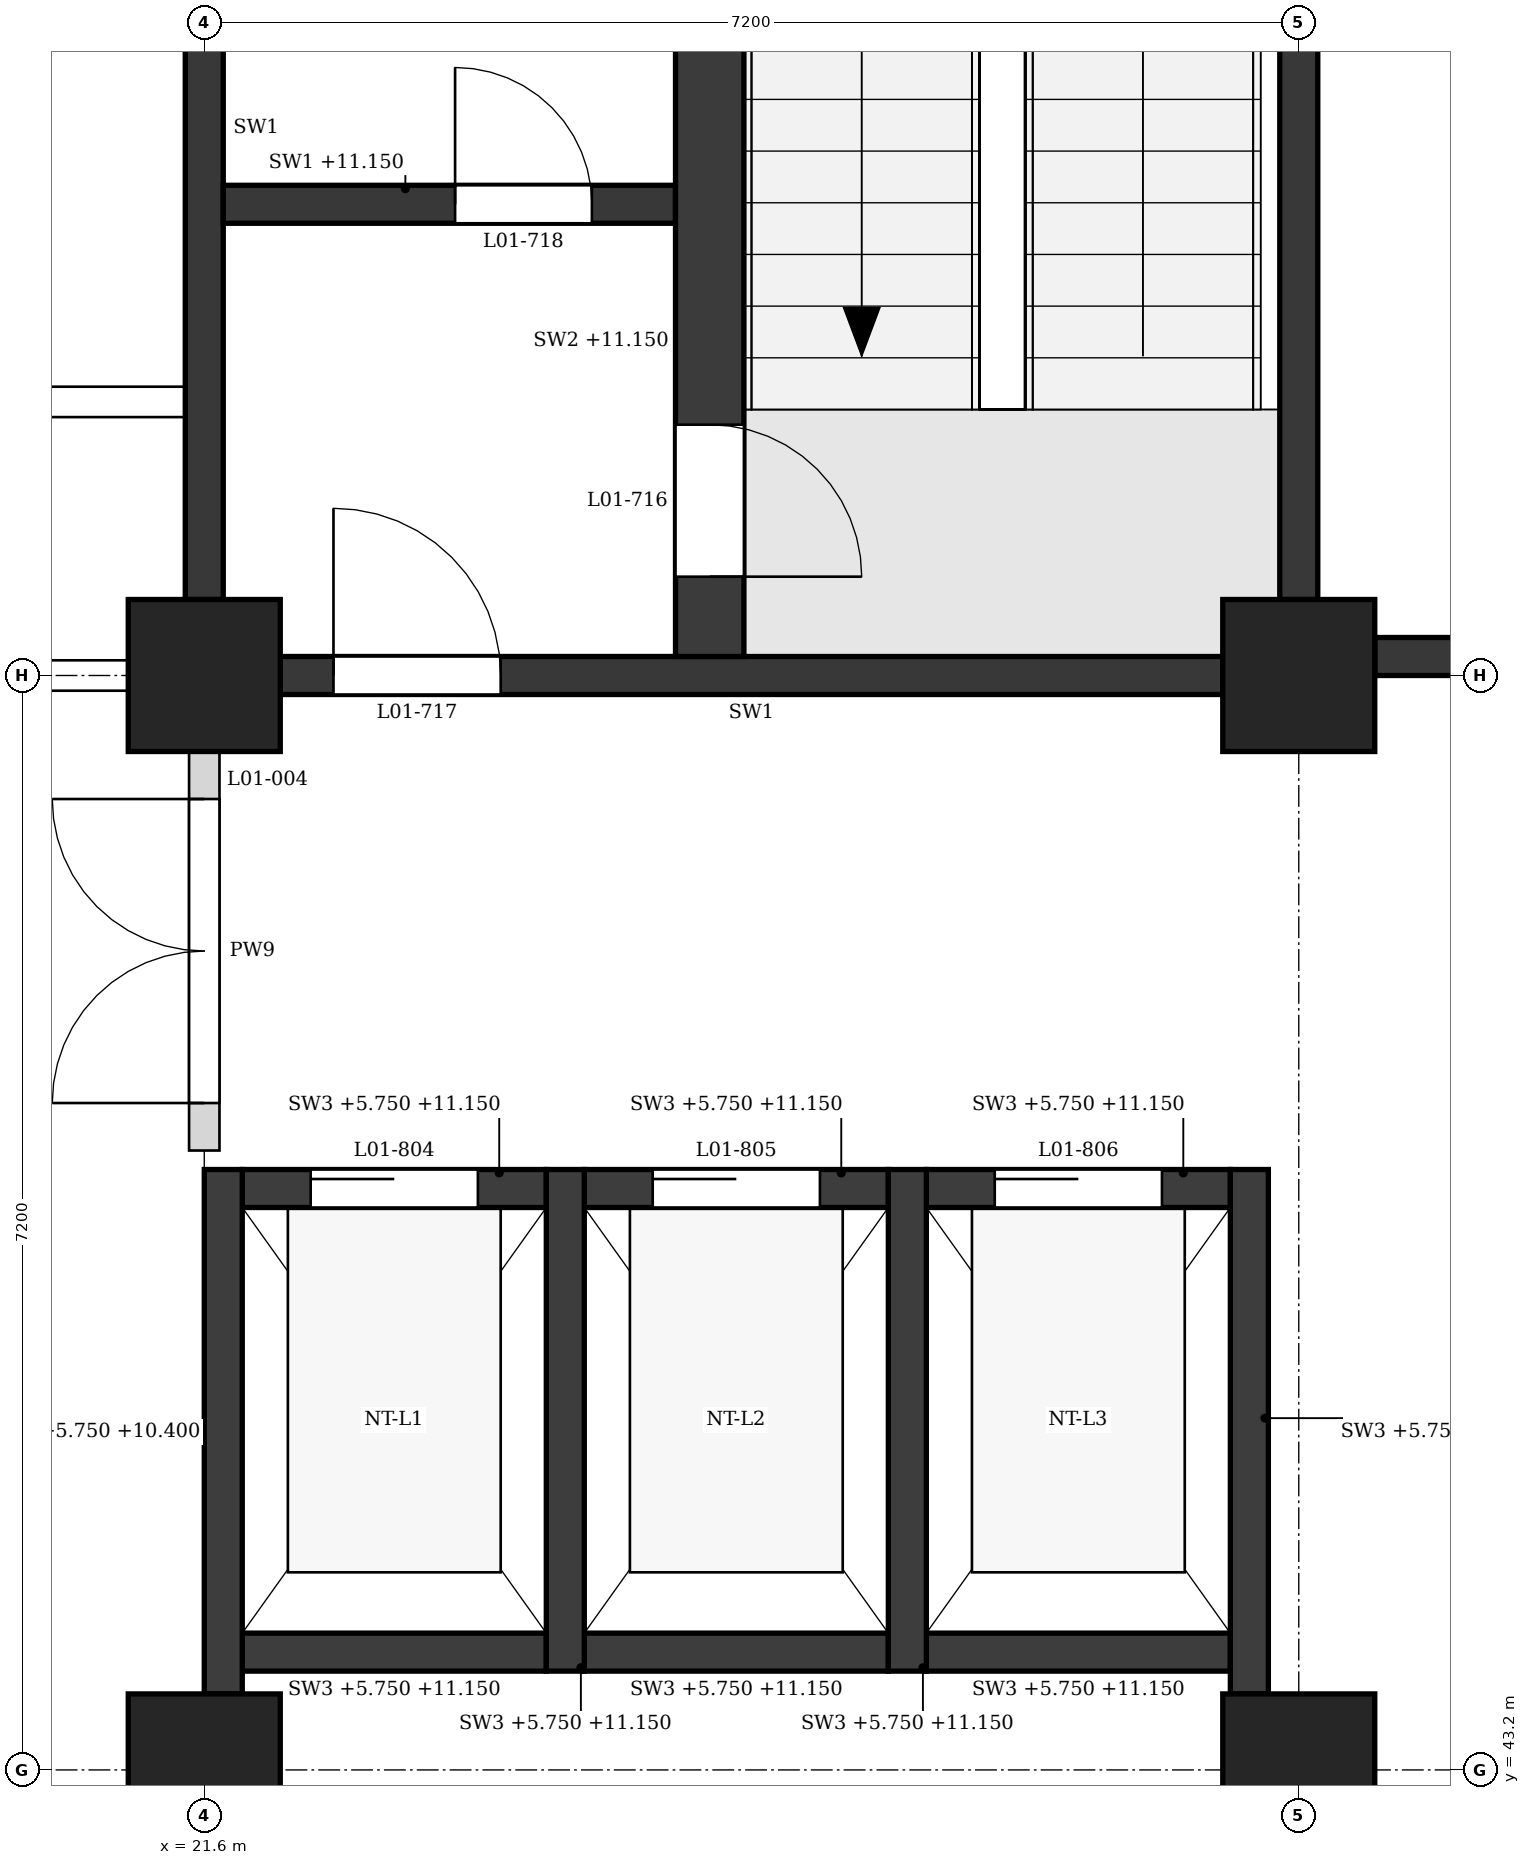
"""IFC4 building model, lengths in metres.
Left out: names, types, materials, properties, quantities, classifications, styles, units other than length and angle.
Written with IfcOpenShell. Run it as: python <this file> out.ifc"""

import sys

from ifc_helpers import new_model, si_unit, direction, frame, frame_2d, origin, origin_2d, place, context, subcontext, project, spatial, polyline, rectangle, outline, extrude, element, fill, save


model = new_model("IFC4")
c1 = context("Model", 3, precision=1e-05, world=origin(), true_north=direction((0.0, 1.0)))
c2 = subcontext(c1, "Body", "Model", "MODEL_VIEW")
j1 = project(units=[si_unit("LENGTHUNIT", "METRE"), si_unit("PLANEANGLEUNIT", "RADIAN")], contexts=[c1])
p1 = place(None, origin())
s1 = spatial("IfcSite", under=j1, at=p1, CompositionType="ELEMENT")
p2 = place(p1, origin())
s2 = spatial("IfcBuilding", under=s1, at=p2, CompositionType="ELEMENT")
p3 = place(p2, frame((0.0, 0.0, 6.0)))
s3 = spatial("IfcBuildingStorey", under=s2, at=p3, CompositionType="ELEMENT", Elevation=6.0)
for number, where, z_axis, x_axis in (
    (1, (21.6, 43.2, 0.0), (0.0, 0.0, 1.0), (1.0, 0.0, 0.0)),
    (2, (21.6, 50.4, 0.0), (0.0, 0.0, 1.0), (1.0, 0.0, 0.0)),
    (3, (28.8, 43.2, 0.0), (0.0, 0.0, 1.0), (1.0, 0.0, 0.0)),
    (4, (28.8, 50.4, 0.0), (0.0, 0.0, 1.0), (1.0, 0.0, 0.0)),
):
    element("IfcColumn", number, at=place(p3, frame(where, z_axis=z_axis, x_axis=x_axis)), inside=s3, PredefinedType="COLUMN", context=c2, shape_type="SweptSolid", body=[
        extrude(rectangle(XDim=1.0, YDim=1.0, at=origin_2d()), origin(), (0.0, 0.0, 1.0), 5.4),
    ])
p4 = place(p3, frame((29.3, 50.525, 0.0), z_axis=(0.0, 0.0, 1.0), x_axis=(1.0, 0.0, 0.0)))
e5 = element("IfcWall", 5, at=p4, inside=s3, PredefinedType="SHEAR", context=c2, shape_type="SweptSolid", body=[
    extrude(rectangle(XDim=6.275, YDim=0.25, at=frame_2d((3.137, 0.0))), origin(), (0.0, 0.0, 1.0), 4.7),
])
p5 = place(p3, frame((28.8, 50.9, -0.25), z_axis=(0.0, 0.0, 1.0), x_axis=(0.0, 1.0, 0.0)))
e6 = element("IfcWall", 6, at=p5, inside=s3, PredefinedType="SHEAR", context=c2, shape_type="SweptSolid", body=[
    extrude(rectangle(XDim=6.2, YDim=0.25, at=frame_2d((3.1, 0.0))), origin(), (0.0, 0.0, 1.0), 4.8),
])
p6 = place(p3, frame((22.1, 50.4, 0.0), z_axis=(0.0, 0.0, 1.0), x_axis=(1.0, 0.0, 0.0)))
e7 = element("IfcWall", 7, at=p6, inside=s3, PredefinedType="SHEAR", context=c2, shape_type="SweptSolid", body=[
    extrude(rectangle(XDim=6.2, YDim=0.25, at=frame_2d((3.1, 0.0))), origin(), (0.0, 0.0, 1.0), 4.4),
])
p7 = place(p6, frame((0.35, 0.0, 0.0)))
e8 = element("IfcOpeningElement", 8, at=p7, cuts=e7, PredefinedType="OPENING", context=c2, shape_type="SweptSolid", body=[
    extrude(rectangle(XDim=1.1, YDim=2.1, at=frame_2d((0.55, 1.05))), frame((0.0, 0.135, 0.0), z_axis=(0.0, -1.0, 0.0), x_axis=(1.0, 0.0, 0.0)), (0.0, 0.0, 1.0), 0.27),
])
p8 = place(p3, frame((21.6, 50.9, 0.0), z_axis=(0.0, 0.0, 1.0), x_axis=(0.0, 1.0, 0.0)))
e9 = element("IfcWall", 9, at=p8, inside=s3, PredefinedType="SHEAR", context=c2, shape_type="SweptSolid", body=[
    extrude(rectangle(XDim=6.2, YDim=0.25, at=frame_2d((3.1, 0.0))), origin(), (0.0, 0.0, 1.0), 4.4),
])
p9 = place(p3, frame((24.925, 50.525, 0.0), z_axis=(0.0, 0.0, 1.0), x_axis=(0.0, 1.0, 0.0)))
e10 = element("IfcWall", 10, at=p9, inside=s3, PredefinedType="SHEAR", context=c2, shape_type="SweptSolid", body=[
    extrude(rectangle(XDim=6.925, YDim=0.45, at=frame_2d((3.462, 0.0))), origin(), (0.0, 0.0, 1.0), 5.15),
])
p10 = place(p9, frame((0.525, 0.0, 0.0)))
e11 = element("IfcOpeningElement", 11, at=p10, cuts=e10, PredefinedType="OPENING", context=c2, shape_type="SweptSolid", body=[
    extrude(rectangle(XDim=1.0, YDim=2.1, at=frame_2d((0.5, 1.05))), frame((0.0, 0.235, 0.0), z_axis=(0.0, -1.0, 0.0), x_axis=(1.0, 0.0, 0.0)), (0.0, 0.0, 1.0), 0.47),
])
p11 = place(p3, frame((21.725, 53.5, 0.0), z_axis=(0.0, 0.0, 1.0), x_axis=(1.0, 0.0, 0.0)))
e12 = element("IfcWall", 12, at=p11, inside=s3, PredefinedType="SHEAR", context=c2, shape_type="SweptSolid", body=[
    extrude(rectangle(XDim=2.975, YDim=0.25, at=frame_2d((1.487, 0.0))), origin(), (0.0, 0.0, 1.0), 5.15),
])
p12 = place(p11, frame((1.525, 0.0, 0.0)))
e13 = element("IfcOpeningElement", 13, at=p12, cuts=e12, PredefinedType="OPENING", context=c2, shape_type="SweptSolid", body=[
    extrude(rectangle(XDim=0.9, YDim=2.1, at=frame_2d((0.45, 1.05))), frame((0.0, 0.135, 0.0), z_axis=(0.0, -1.0, 0.0), x_axis=(1.0, 0.0, 0.0)), (0.0, 0.0, 1.0), 0.27),
])
p13 = place(p3, frame((21.725, 43.7, -0.25), z_axis=(0.0, 0.0, 1.0), x_axis=(0.0, 1.0, 0.0)))
e14 = element("IfcWall", 14, at=p13, inside=s3, PredefinedType="SHEAR", context=c2, shape_type="SweptSolid", body=[
    extrude(rectangle(XDim=3.45, YDim=0.25, at=frame_2d((1.725, 0.0))), origin(), (0.0, 0.0, 1.0), 4.65),
])
for number, where, z_axis, x_axis in (
    (15, (23.975, 43.85, -0.25), (0.0, 0.0, 1.0), (0.0, 1.0, 0.0)),
    (16, (26.225, 43.85, -0.25), (0.0, 0.0, 1.0), (0.0, 1.0, 0.0)),
):
    element("IfcWall", number, at=place(p3, frame(where, z_axis=z_axis, x_axis=x_axis)), inside=s3, PredefinedType="SHEAR", context=c2, shape_type="SweptSolid", body=[
        extrude(rectangle(XDim=3.3, YDim=0.25, at=frame_2d((1.65, 0.0))), origin(), (0.0, 0.0, 1.0), 5.4),
    ])
p14 = place(p3, frame((28.475, 43.7, -0.25), z_axis=(0.0, 0.0, 1.0), x_axis=(0.0, 1.0, 0.0)))
e17 = element("IfcWall", 17, at=p14, inside=s3, PredefinedType="SHEAR", context=c2, shape_type="SweptSolid", body=[
    extrude(rectangle(XDim=3.45, YDim=0.25, at=frame_2d((1.725, 0.0))), origin(), (0.0, 0.0, 1.0), 5.4),
])
p15 = place(p3, frame((21.85, 47.025, -0.25), z_axis=(0.0, 0.0, 1.0), x_axis=(1.0, 0.0, 0.0)))
e18 = element("IfcWall", 18, at=p15, inside=s3, PredefinedType="SHEAR", context=c2, shape_type="SweptSolid", body=[
    extrude(rectangle(XDim=2.0, YDim=0.25, at=frame_2d((1.0, 0.0))), origin(), (0.0, 0.0, 1.0), 5.4),
])
p16 = place(p15, frame((0.45, 0.0, 0.25)))
e19 = element("IfcOpeningElement", 19, at=p16, cuts=e18, PredefinedType="OPENING", context=c2, shape_type="SweptSolid", body=[
    extrude(rectangle(XDim=1.1, YDim=2.1, at=frame_2d((0.55, 1.05))), frame((0.0, 0.135, 0.0), z_axis=(0.0, -1.0, 0.0), x_axis=(1.0, 0.0, 0.0)), (0.0, 0.0, 1.0), 0.27),
])
p17 = place(p3, frame((21.85, 43.975, -0.25), z_axis=(0.0, 0.0, 1.0), x_axis=(1.0, 0.0, 0.0)))
e20 = element("IfcWall", 20, at=p17, inside=s3, PredefinedType="SHEAR", context=c2, shape_type="SweptSolid", body=[
    extrude(rectangle(XDim=2.0, YDim=0.25, at=frame_2d((1.0, 0.0))), origin(), (0.0, 0.0, 1.0), 5.4),
])
p18 = place(p3, frame((24.1, 47.025, -0.25), z_axis=(0.0, 0.0, 1.0), x_axis=(1.0, 0.0, 0.0)))
e21 = element("IfcWall", 21, at=p18, inside=s3, PredefinedType="SHEAR", context=c2, shape_type="SweptSolid", body=[
    extrude(rectangle(XDim=2.0, YDim=0.25, at=frame_2d((1.0, 0.0))), origin(), (0.0, 0.0, 1.0), 5.4),
])
p19 = place(p18, frame((0.45, 0.0, 0.25)))
e22 = element("IfcOpeningElement", 22, at=p19, cuts=e21, PredefinedType="OPENING", context=c2, shape_type="SweptSolid", body=[
    extrude(rectangle(XDim=1.1, YDim=2.1, at=frame_2d((0.55, 1.05))), frame((0.0, 0.135, 0.0), z_axis=(0.0, -1.0, 0.0), x_axis=(1.0, 0.0, 0.0)), (0.0, 0.0, 1.0), 0.27),
])
p20 = place(p3, frame((24.1, 43.975, -0.25), z_axis=(0.0, 0.0, 1.0), x_axis=(1.0, 0.0, 0.0)))
e23 = element("IfcWall", 23, at=p20, inside=s3, PredefinedType="SHEAR", context=c2, shape_type="SweptSolid", body=[
    extrude(rectangle(XDim=2.0, YDim=0.25, at=frame_2d((1.0, 0.0))), origin(), (0.0, 0.0, 1.0), 5.4),
])
p21 = place(p3, frame((26.35, 47.025, -0.25), z_axis=(0.0, 0.0, 1.0), x_axis=(1.0, 0.0, 0.0)))
e24 = element("IfcWall", 24, at=p21, inside=s3, PredefinedType="SHEAR", context=c2, shape_type="SweptSolid", body=[
    extrude(rectangle(XDim=2.0, YDim=0.25, at=frame_2d((1.0, 0.0))), origin(), (0.0, 0.0, 1.0), 5.4),
])
p22 = place(p21, frame((0.45, 0.0, 0.25)))
e25 = element("IfcOpeningElement", 25, at=p22, cuts=e24, PredefinedType="OPENING", context=c2, shape_type="SweptSolid", body=[
    extrude(rectangle(XDim=1.1, YDim=2.1, at=frame_2d((0.55, 1.05))), frame((0.0, 0.135, 0.0), z_axis=(0.0, -1.0, 0.0), x_axis=(1.0, 0.0, 0.0)), (0.0, 0.0, 1.0), 0.27),
])
p23 = place(p3, frame((26.35, 43.975, -0.25), z_axis=(0.0, 0.0, 1.0), x_axis=(1.0, 0.0, 0.0)))
e26 = element("IfcWall", 26, at=p23, inside=s3, PredefinedType="SHEAR", context=c2, shape_type="SweptSolid", body=[
    extrude(rectangle(XDim=2.0, YDim=0.25, at=frame_2d((1.0, 0.0))), origin(), (0.0, 0.0, 1.0), 5.4),
])
p24 = place(p2, origin())
s4 = spatial("IfcBuildingStorey", under=s2, at=p24, CompositionType="ELEMENT", Elevation=0.0)
p25 = place(p24, frame((29.3, 50.2, 0.0), z_axis=(0.0, 0.0, 1.0), x_axis=(1.0, 0.0, 0.0)))
e27 = element("IfcWall", 27, at=p25, inside=s4, PredefinedType="SOLIDWALL", context=c2, shape_type="SweptSolid", body=[
    extrude(rectangle(XDim=6.275, YDim=0.4, at=frame_2d((3.137, 0.0))), origin(), (0.0, 0.0, 1.0), 10.7),
])
p26 = place(p24, frame((29.0, 43.7, 0.0), z_axis=(0.0, 0.0, 1.0), x_axis=(0.0, 1.0, 0.0)))
e28 = element("IfcWall", 28, at=p26, inside=s4, PredefinedType="SOLIDWALL", context=c2, shape_type="SweptSolid", body=[
    extrude(rectangle(XDim=6.2, YDim=0.4, at=frame_2d((3.1, 0.0))), origin(), (0.0, 0.0, 1.0), 10.55),
])
p27 = place(p3, frame((14.9, 50.4, 0.0), z_axis=(0.0, 0.0, 1.0), x_axis=(1.0, 0.0, 0.0)))
e29 = element("IfcWall", 29, at=p27, inside=s3, PredefinedType="PARTITIONING", context=c2, shape_type="SweptSolid", body=[
    extrude(rectangle(XDim=6.2, YDim=0.2, at=frame_2d((3.1, 0.0))), origin(), (0.0, 0.0, 1.0), 4.4),
])
p28 = place(p27, frame((4.15, 0.0, 0.0)))
e30 = element("IfcOpeningElement", 30, at=p28, cuts=e29, PredefinedType="OPENING", context=c2, shape_type="SweptSolid", body=[
    extrude(rectangle(XDim=1.0, YDim=2.1, at=frame_2d((0.5, 1.05))), frame((0.0, 0.11, 0.0), z_axis=(0.0, -1.0, 0.0), x_axis=(1.0, 0.0, 0.0)), (0.0, 0.0, 1.0), 0.22),
])
p29 = place(p3, frame((7.325, 52.2, 0.0), z_axis=(0.0, 0.0, 1.0), x_axis=(1.0, 0.0, 0.0)))
e31 = element("IfcWall", 31, at=p29, inside=s3, PredefinedType="PARTITIONING", context=c2, shape_type="SweptSolid", body=[
    extrude(outline(polyline([(0.0, 0.0), (14.15, 0.0), (14.15, 4.4), (14.025, 4.4), (14.025, 5.15), (7.325, 5.15), (7.325, 4.4), (6.825, 4.4), (6.825, 5.15), (0.125, 5.15), (0.125, 4.4), (0.0, 4.4), (0.0, 0.0)])), frame((0.0, 0.1, 0.0), z_axis=(0.0, -1.0, 0.0), x_axis=(1.0, 0.0, 0.0)), (0.0, 0.0, 1.0), 0.2),
])
p30 = place(p29, frame((1.238, 0.0, 0.0)))
e32 = element("IfcOpeningElement", 32, at=p30, cuts=e31, PredefinedType="OPENING", context=c2, shape_type="SweptSolid", body=[
    extrude(rectangle(XDim=1.0, YDim=2.1, at=frame_2d((0.5, 1.05))), frame((0.0, 0.11, 0.0), z_axis=(0.0, -1.0, 0.0), x_axis=(1.0, 0.0, 0.0)), (0.0, 0.0, 1.0), 0.22),
])
p31 = place(p29, frame((4.775, 0.0, 0.0)))
e33 = element("IfcOpeningElement", 33, at=p31, cuts=e31, PredefinedType="OPENING", context=c2, shape_type="SweptSolid", body=[
    extrude(rectangle(XDim=1.0, YDim=2.1, at=frame_2d((0.5, 1.05))), frame((0.0, 0.11, 0.0), z_axis=(0.0, -1.0, 0.0), x_axis=(1.0, 0.0, 0.0)), (0.0, 0.0, 1.0), 0.22),
])
p32 = place(p29, frame((8.375, 0.0, 0.0)))
e34 = element("IfcOpeningElement", 34, at=p32, cuts=e31, PredefinedType="OPENING", context=c2, shape_type="SweptSolid", body=[
    extrude(rectangle(XDim=1.0, YDim=2.1, at=frame_2d((0.5, 1.05))), frame((0.0, 0.11, 0.0), z_axis=(0.0, -1.0, 0.0), x_axis=(1.0, 0.0, 0.0)), (0.0, 0.0, 1.0), 0.22),
])
p33 = place(p29, frame((11.913, 0.0, 0.0)))
e35 = element("IfcOpeningElement", 35, at=p33, cuts=e31, PredefinedType="OPENING", context=c2, shape_type="SweptSolid", body=[
    extrude(rectangle(XDim=1.0, YDim=2.1, at=frame_2d((0.5, 1.05))), frame((0.0, 0.11, 0.0), z_axis=(0.0, -1.0, 0.0), x_axis=(1.0, 0.0, 0.0)), (0.0, 0.0, 1.0), 0.22),
])
p34 = place(p3, frame((21.6, 47.275, 0.0), z_axis=(0.0, 0.0, 1.0), x_axis=(0.0, 1.0, 0.0)))
e36 = element("IfcWall", 36, at=p34, inside=s3, PredefinedType="PARTITIONING", context=c2, shape_type="SweptSolid", body=[
    extrude(rectangle(XDim=2.625, YDim=0.2, at=frame_2d((1.312, 0.0))), origin(), (0.0, 0.0, 1.0), 4.4),
])
p35 = place(p34, frame((0.312, 0.0, 0.0)))
e37 = element("IfcOpeningElement", 37, at=p35, cuts=e36, PredefinedType="OPENING", context=c2, shape_type="SweptSolid", body=[
    extrude(rectangle(XDim=2.0, YDim=2.4, at=frame_2d((1.0, 1.2))), frame((0.0, 0.11, 0.0), z_axis=(0.0, -1.0, 0.0), x_axis=(1.0, 0.0, 0.0)), (0.0, 0.0, 1.0), 0.22),
])
p36 = place(p10, frame((1.0, 0.0, 0.0), z_axis=(0.0, 0.0, 1.0), x_axis=(-1.0, 0.0, 0.0)))
e38 = element("IfcDoor", 38, at=p36, inside=s3, OperationType="SINGLE_SWING_RIGHT", PredefinedType="DOOR", context=c2, shape_type="SweptSolid", body=[
    extrude(rectangle(XDim=1.0, YDim=2.1, at=frame_2d((0.5, 1.05))), frame((0.0, 0.025, 0.0), z_axis=(0.0, -1.0, 0.0), x_axis=(1.0, 0.0, 0.0)), (0.0, 0.0, 1.0), 0.05),
])
fill(e11, e38)
p37 = place(p7, origin())
e39 = element("IfcDoor", 39, at=p37, inside=s3, OperationType="SINGLE_SWING_LEFT", PredefinedType="DOOR", context=c2, shape_type="SweptSolid", body=[
    extrude(rectangle(XDim=1.1, YDim=2.1, at=frame_2d((0.55, 1.05))), frame((0.0, 0.025, 0.0), z_axis=(0.0, -1.0, 0.0), x_axis=(1.0, 0.0, 0.0)), (0.0, 0.0, 1.0), 0.05),
])
fill(e8, e39)
p38 = place(p12, origin())
e40 = element("IfcDoor", 40, at=p38, inside=s3, OperationType="SINGLE_SWING_LEFT", PredefinedType="DOOR", context=c2, shape_type="SweptSolid", body=[
    extrude(rectangle(XDim=0.9, YDim=2.1, at=frame_2d((0.45, 1.05))), frame((0.0, 0.025, 0.0), z_axis=(0.0, -1.0, 0.0), x_axis=(1.0, 0.0, 0.0)), (0.0, 0.0, 1.0), 0.05),
])
fill(e13, e40)
p39 = place(p16, origin())
e41 = element("IfcDoor", 41, at=p39, inside=s3, OperationType="SLIDING_TO_LEFT", PredefinedType="DOOR", context=c2, shape_type="SweptSolid", body=[
    extrude(rectangle(XDim=1.1, YDim=2.1, at=frame_2d((0.55, 1.05))), frame((0.0, 0.025, 0.0), z_axis=(0.0, -1.0, 0.0), x_axis=(1.0, 0.0, 0.0)), (0.0, 0.0, 1.0), 0.05),
])
fill(e19, e41)
p40 = place(p19, origin())
e42 = element("IfcDoor", 42, at=p40, inside=s3, OperationType="SLIDING_TO_LEFT", PredefinedType="DOOR", context=c2, shape_type="SweptSolid", body=[
    extrude(rectangle(XDim=1.1, YDim=2.1, at=frame_2d((0.55, 1.05))), frame((0.0, 0.025, 0.0), z_axis=(0.0, -1.0, 0.0), x_axis=(1.0, 0.0, 0.0)), (0.0, 0.0, 1.0), 0.05),
])
fill(e22, e42)
p41 = place(p22, origin())
e43 = element("IfcDoor", 43, at=p41, inside=s3, OperationType="SLIDING_TO_LEFT", PredefinedType="DOOR", context=c2, shape_type="SweptSolid", body=[
    extrude(rectangle(XDim=1.1, YDim=2.1, at=frame_2d((0.55, 1.05))), frame((0.0, 0.025, 0.0), z_axis=(0.0, -1.0, 0.0), x_axis=(1.0, 0.0, 0.0)), (0.0, 0.0, 1.0), 0.05),
])
fill(e25, e43)
p42 = place(p35, origin())
e44 = element("IfcDoor", 44, at=p42, inside=s3, OperationType="DOUBLE_DOOR_SINGLE_SWING", PredefinedType="DOOR", context=c2, shape_type="SweptSolid", body=[
    extrude(rectangle(XDim=2.0, YDim=2.4, at=frame_2d((1.0, 1.2))), frame((0.0, 0.025, 0.0), z_axis=(0.0, -1.0, 0.0), x_axis=(1.0, 0.0, 0.0)), (0.0, 0.0, 1.0), 0.05),
])
fill(e37, e44)
save(model, sys.argv[1])
